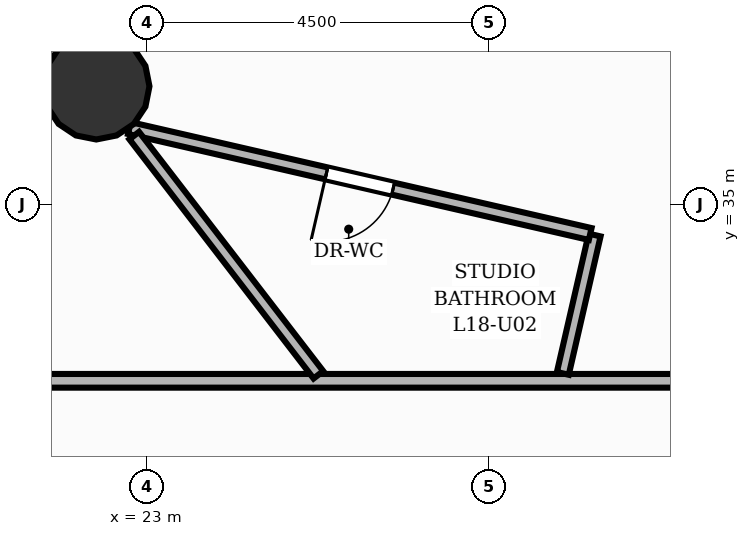
"""IFC4 building model, lengths in metres.
Left out: names, types, materials, properties, quantities, classifications, styles, units other than length and angle.
Written with IfcOpenShell. Run it as: python <this file> out.ifc"""

import sys

from ifc_helpers import new_model, si_unit, direction, frame, frame_2d, origin, origin_2d, place, context, subcontext, project, spatial, rectangle, circle, extrude, element, fill, save


model = new_model("IFC4")
c1 = context("Model", 3, precision=1e-05, world=origin(), true_north=direction((0.0, 1.0)))
c2 = subcontext(c1, "Body", "Model", "MODEL_VIEW")
j1 = project(units=[si_unit("LENGTHUNIT", "METRE"), si_unit("PLANEANGLEUNIT", "RADIAN")], contexts=[c1])
p1 = place(None, origin())
s1 = spatial("IfcSite", under=j1, at=p1, CompositionType="ELEMENT")
p2 = place(p1, origin())
s2 = spatial("IfcBuilding", under=s1, at=p2, CompositionType="ELEMENT")
p3 = place(p2, frame((0.0, 0.0, 63.2)))
s3 = spatial("IfcBuildingStorey", under=s2, at=p3, CompositionType="ELEMENT", Elevation=63.2)
p4 = place(p3, frame((22.333, 36.555, 0.0), z_axis=(0.0, 0.0, 1.0), x_axis=(1.0, 0.0, 0.0)))
e1 = element("IfcColumn", 1, at=p4, inside=s3, PredefinedType="COLUMN", context=c2, shape_type="SweptSolid", body=[
    extrude(circle(Radius=0.7, at=origin_2d()), origin(), (0.0, 0.0, 1.0), 3.2),
])
p5 = place(p3, frame((21.32, 32.68, 0.0), z_axis=(0.0, 0.0, 1.0), x_axis=(1.0, 0.0, 0.0)))
e2 = element("IfcWall", 2, at=p5, inside=s3, PredefinedType="PARTITIONING", context=c2, shape_type="SweptSolid", body=[
    extrude(rectangle(XDim=21.3, YDim=0.18, at=frame_2d((10.65, 0.0))), origin(), (0.0, 0.0, 1.0), 2.795),
])
p6 = place(p5, frame((13.68, 0.0, 0.0)))
e3 = element("IfcOpeningElement", 3, at=p6, cuts=e2, PredefinedType="OPENING", context=c2, shape_type="SweptSolid", body=[
    extrude(rectangle(XDim=1.05, YDim=2.15, at=frame_2d((0.525, 1.075))), frame((0.0, 0.1, 0.0), z_axis=(0.0, -1.0, 0.0), x_axis=(1.0, 0.0, 0.0)), (0.0, 0.0, 1.0), 0.2),
])
p7 = place(p3, frame((28.472, 32.778, 0.0), z_axis=(0.0, 0.0, 1.0), x_axis=(0.224134039234, 0.974558326862, 0.0)))
e4 = element("IfcWall", 4, at=p7, inside=s3, PredefinedType="PLUMBINGWALL", context=c2, shape_type="SweptSolid", body=[
    extrude(rectangle(XDim=1.868, YDim=0.16, at=frame_2d((0.934, 0.0))), origin(), (0.0, 0.0, 1.0), 2.795),
])
p8 = place(p3, frame((28.832, 34.612, 0.0), z_axis=(0.0, 0.0, 1.0), x_axis=(-0.97457275657, 0.224071288102, 0.0)))
e5 = element("IfcWall", 5, at=p8, inside=s3, PredefinedType="PLUMBINGWALL", context=c2, shape_type="SweptSolid", body=[
    extrude(rectangle(XDim=6.221, YDim=0.16, at=frame_2d((3.111, 0.0))), origin(), (0.0, 0.0, 1.0), 2.795),
])
p9 = place(p8, frame((2.661, 0.0, 0.0)))
e6 = element("IfcOpeningElement", 6, at=p9, cuts=e5, PredefinedType="OPENING", context=c2, shape_type="SweptSolid", body=[
    extrude(rectangle(XDim=0.9, YDim=2.1, at=frame_2d((0.45, 1.05))), frame((0.0, 0.09, 0.0), z_axis=(0.0, -1.0, 0.0), x_axis=(1.0, 0.0, 0.0)), (0.0, 0.0, 1.0), 0.18),
])
p10 = place(p3, frame((25.256, 32.759, 0.0), z_axis=(0.0, 0.0, 1.0), x_axis=(-0.610090898762, 0.792331430178, 0.0)))
e7 = element("IfcWall", 7, at=p10, inside=s3, PredefinedType="PLUMBINGWALL", context=c2, shape_type="SweptSolid", body=[
    extrude(rectangle(XDim=3.972, YDim=0.16, at=frame_2d((1.986, 0.0))), origin(), (0.0, 0.0, 1.0), 2.018),
])
p11 = place(p9, origin())
e8 = element("IfcDoor", 8, at=p11, inside=s3, OperationType="SINGLE_SWING_RIGHT", PredefinedType="DOOR", context=c2, shape_type="SweptSolid", body=[
    extrude(rectangle(XDim=0.9, YDim=2.1, at=frame_2d((0.45, 1.05))), frame((0.0, 0.025, 0.0), z_axis=(0.0, -1.0, 0.0), x_axis=(1.0, 0.0, 0.0)), (0.0, 0.0, 1.0), 0.05),
])
fill(e6, e8)
save(model, sys.argv[1])
